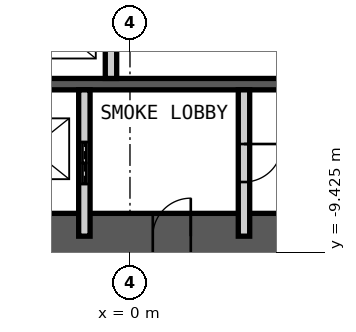
"""IFC4 building model, lengths in metres.
Left out: names, types, materials, properties, quantities, classifications, styles, units other than length and angle.
Written with IfcOpenShell. Run it as: python <this file> out.ifc"""

import sys

from ifc_helpers import new_model, si_unit, direction, frame, frame_2d, origin, place, context, subcontext, project, spatial, rectangle, extrude, element, fill, save


model = new_model("IFC4")
c1 = context("Model", 3, precision=1e-05, world=origin(), true_north=direction((0.0, 1.0)))
c2 = subcontext(c1, "Body", "Model", "MODEL_VIEW")
j1 = project(units=[si_unit("LENGTHUNIT", "METRE"), si_unit("PLANEANGLEUNIT", "RADIAN")], contexts=[c1])
p1 = place(None, origin())
s1 = spatial("IfcSite", under=j1, at=p1, CompositionType="ELEMENT")
p2 = place(p1, origin())
s2 = spatial("IfcBuilding", under=s1, at=p2, CompositionType="ELEMENT")
p3 = place(p2, frame((0.0, 0.0, 180.4)))
s3 = spatial("IfcBuildingStorey", under=s2, at=p3, CompositionType="ELEMENT", Elevation=180.4)
p4 = place(p3, frame((-12.0, -9.0, 0.0), z_axis=(0.0, 0.0, 1.0), x_axis=(1.0, 0.0, 0.0)))
e1 = element("IfcWall", 1, at=p4, inside=s3, PredefinedType="SHEAR", context=c2, shape_type="SweptSolid", body=[
    extrude(rectangle(XDim=24.0, YDim=1.2, at=frame_2d((12.0, 0.0))), origin(), (0.0, 0.0, 1.0), 4.2),
])
p5 = place(p4, frame((1.35, 0.0, 0.0)))
e2 = element("IfcOpeningElement", 2, at=p5, cuts=e1, PredefinedType="OPENING", context=c2, shape_type="SweptSolid", body=[
    extrude(rectangle(XDim=1.0, YDim=2.1, at=frame_2d((0.5, 1.05))), frame((0.0, 0.61, 0.0), z_axis=(0.0, -1.0, 0.0), x_axis=(1.0, 0.0, 0.0)), (0.0, 0.0, 1.0), 1.22),
])
p6 = place(p4, frame((5.325, 0.0, 0.0)))
e3 = element("IfcOpeningElement", 3, at=p6, cuts=e1, PredefinedType="OPENING", context=c2, shape_type="SweptSolid", body=[
    extrude(rectangle(XDim=1.15, YDim=2.1, at=frame_2d((0.575, 1.05))), frame((0.0, 0.61, 0.0), z_axis=(0.0, -1.0, 0.0), x_axis=(1.0, 0.0, 0.0)), (0.0, 0.0, 1.0), 1.22),
])
p7 = place(p4, frame((12.6, 0.0, 0.0)))
e4 = element("IfcOpeningElement", 4, at=p7, cuts=e1, PredefinedType="OPENING", context=c2, shape_type="SweptSolid", body=[
    extrude(rectangle(XDim=1.0, YDim=2.1, at=frame_2d((0.5, 1.05))), frame((0.0, 0.61, 0.0), z_axis=(0.0, -1.0, 0.0), x_axis=(1.0, 0.0, 0.0)), (0.0, 0.0, 1.0), 1.22),
])
p8 = place(p3, frame((-12.0, -5.0, 0.0), z_axis=(0.0, 0.0, 1.0), x_axis=(1.0, 0.0, 0.0)))
e5 = element("IfcWall", 5, at=p8, inside=s3, PredefinedType="SHEAR", context=c2, shape_type="SweptSolid", body=[
    extrude(rectangle(XDim=24.0, YDim=0.3, at=frame_2d((12.0, 0.0))), origin(), (0.0, 0.0, 1.0), 4.2),
])
p9 = place(p3, frame((-0.5, -4.85, 0.0), z_axis=(0.0, 0.0, 1.0), x_axis=(0.0, 1.0, 0.0)))
e6 = element("IfcWall", 6, at=p9, inside=s3, PredefinedType="PARTITIONING", context=c2, shape_type="SweptSolid", body=[
    extrude(rectangle(XDim=2.65, YDim=0.3, at=frame_2d((1.325, 0.0))), origin(), (0.0, 0.0, 1.0), 3.98),
])
p10 = place(p3, frame((-1.2, -9.0, 0.0), z_axis=(0.0, 0.0, 1.0), x_axis=(0.0, 1.0, 0.0)))
e7 = element("IfcWall", 7, at=p10, inside=s3, PredefinedType="PARTITIONING", context=c2, shape_type="SweptSolid", body=[
    extrude(rectangle(XDim=3.85, YDim=0.3, at=frame_2d((1.925, 0.0))), origin(), (0.0, 0.0, 1.0), 3.98),
])
p11 = place(p10, frame((1.375, 0.0, 0.0)))
e8 = element("IfcOpeningElement", 8, at=p11, cuts=e7, PredefinedType="OPENING", context=c2, shape_type="SweptSolid", body=[
    extrude(rectangle(XDim=1.1, YDim=2.4, at=frame_2d((0.55, 1.2))), frame((0.0, 0.16, 0.0), z_axis=(0.0, -1.0, 0.0), x_axis=(1.0, 0.0, 0.0)), (0.0, 0.0, 1.0), 0.32),
])
p12 = place(p3, frame((3.0, -9.0, 0.0), z_axis=(0.0, 0.0, 1.0), x_axis=(0.0, 1.0, 0.0)))
e9 = element("IfcWall", 9, at=p12, inside=s3, PredefinedType="PARTITIONING", context=c2, shape_type="SweptSolid", body=[
    extrude(rectangle(XDim=3.85, YDim=0.3, at=frame_2d((1.925, 0.0))), origin(), (0.0, 0.0, 1.0), 3.98),
])
p13 = place(p12, frame((1.425, 0.0, 0.0)))
e10 = element("IfcOpeningElement", 10, at=p13, cuts=e9, PredefinedType="OPENING", context=c2, shape_type="SweptSolid", body=[
    extrude(rectangle(XDim=1.0, YDim=2.1, at=frame_2d((0.5, 1.05))), frame((0.0, 0.16, 0.0), z_axis=(0.0, -1.0, 0.0), x_axis=(1.0, 0.0, 0.0)), (0.0, 0.0, 1.0), 0.32),
])
p14 = place(p7, origin())
e11 = element("IfcDoor", 11, at=p14, inside=s3, OperationType="SINGLE_SWING_LEFT", PredefinedType="DOOR", context=c2, shape_type="SweptSolid", body=[
    extrude(rectangle(XDim=1.0, YDim=2.1, at=frame_2d((0.5, 1.05))), frame((0.0, 0.025, 0.0), z_axis=(0.0, -1.0, 0.0), x_axis=(1.0, 0.0, 0.0)), (0.0, 0.0, 1.0), 0.05),
])
fill(e4, e11)
p15 = place(p13, origin())
e12 = element("IfcDoor", 12, at=p15, inside=s3, OperationType="SINGLE_SWING_RIGHT", PredefinedType="DOOR", context=c2, shape_type="SweptSolid", body=[
    extrude(rectangle(XDim=1.0, YDim=2.1, at=frame_2d((0.5, 1.05))), frame((0.0, 0.025, 0.0), z_axis=(0.0, -1.0, 0.0), x_axis=(1.0, 0.0, 0.0)), (0.0, 0.0, 1.0), 0.05),
])
fill(e10, e12)
p16 = place(p11, origin())
e13 = element("IfcDoor", 13, at=p16, inside=s3, OperationType="DOUBLE_DOOR_SLIDING", PredefinedType="DOOR", context=c2, shape_type="SweptSolid", body=[
    extrude(rectangle(XDim=1.1, YDim=2.4, at=frame_2d((0.55, 1.2))), frame((0.0, 0.025, 0.0), z_axis=(0.0, -1.0, 0.0), x_axis=(1.0, 0.0, 0.0)), (0.0, 0.0, 1.0), 0.05),
])
fill(e8, e13)
save(model, sys.argv[1])
